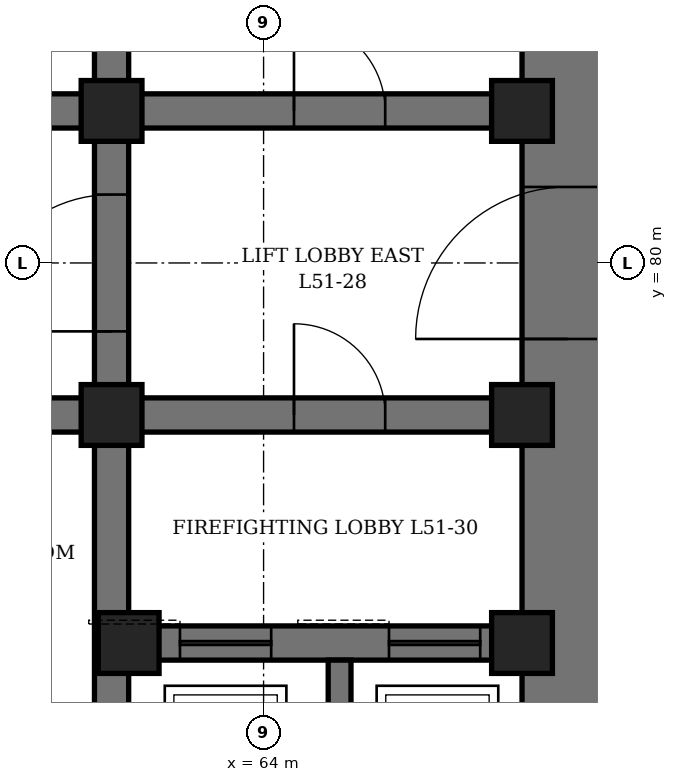
"""IFC4 building model, lengths in metres.
Left out: names, types, materials, properties, quantities, classifications, styles, units other than length and angle.
Written with IfcOpenShell. Run it as: python <this file> out.ifc"""

import sys

from ifc_helpers import new_model, si_unit, direction, frame, frame_2d, origin, origin_2d, place, context, subcontext, project, spatial, rectangle, hollow_rectangle, extrude, element, fill, save


model = new_model("IFC4")
c1 = context("Model", 3, precision=1e-05, world=origin(), true_north=direction((0.0, 1.0)))
c2 = subcontext(c1, "Body", "Model", "MODEL_VIEW")
j1 = project(units=[si_unit("LENGTHUNIT", "METRE"), si_unit("PLANEANGLEUNIT", "RADIAN")], contexts=[c1])
p1 = place(None, origin())
s1 = spatial("IfcSite", under=j1, at=p1, CompositionType="ELEMENT")
p2 = place(p1, origin())
s2 = spatial("IfcBuilding", under=s1, at=p2, CompositionType="ELEMENT")
p3 = place(p2, frame((0.0, 0.0, 227.5)))
s3 = spatial("IfcBuildingStorey", under=s2, at=p3, CompositionType="ELEMENT", Elevation=227.5)
p4 = place(p3, frame((68.0, 70.4, 0.0), z_axis=(0.0, 0.0, 1.0), x_axis=(0.0, 1.0, 0.0)))
e1 = element("IfcWall", 1, at=p4, inside=s3, PredefinedType="SHEAR", context=c2, shape_type="SweptSolid", body=[
    extrude(rectangle(XDim=19.2, YDim=1.2, at=frame_2d((9.6, 0.0))), origin(), (0.0, 0.0, 1.0), 4.2),
])
p5 = place(p4, frame((8.6, 0.0, 0.0)))
e2 = element("IfcOpeningElement", 2, at=p5, cuts=e1, PredefinedType="OPENING", context=c2, shape_type="SweptSolid", body=[
    extrude(rectangle(XDim=2.0, YDim=2.4, at=frame_2d((1.0, 1.2))), frame((0.0, 0.61, 0.0), z_axis=(0.0, -1.0, 0.0), x_axis=(1.0, 0.0, 0.0)), (0.0, 0.0, 1.0), 1.22),
])
p6 = place(p3, frame((62.0, 71.6, 0.0), z_axis=(0.0, 0.0, 1.0), x_axis=(0.0, 1.0, 0.0)))
e3 = element("IfcWall", 3, at=p6, inside=s3, PredefinedType="SHEAR", context=c2, shape_type="SweptSolid", body=[
    extrude(rectangle(XDim=16.8, YDim=0.45, at=frame_2d((8.4, 0.0))), origin(), (0.0, 0.0, 1.0), 4.2),
])
p7 = place(p6, frame((7.5, 0.0, 0.0)))
e4 = element("IfcOpeningElement", 4, at=p7, cuts=e3, PredefinedType="OPENING", context=c2, shape_type="SweptSolid", body=[
    extrude(rectangle(XDim=1.8, YDim=2.4, at=frame_2d((0.9, 1.2))), frame((0.0, 0.235, 0.0), z_axis=(0.0, -1.0, 0.0), x_axis=(1.0, 0.0, 0.0)), (0.0, 0.0, 1.0), 0.47),
])
p8 = place(p3, frame((62.225, 75.0, 0.0), z_axis=(0.0, 0.0, 1.0), x_axis=(1.0, 0.0, 0.0)))
e5 = element("IfcWall", 5, at=p8, inside=s3, PredefinedType="SHEAR", context=c2, shape_type="SweptSolid", body=[
    extrude(rectangle(XDim=5.175, YDim=0.45, at=frame_2d((2.587, 0.0))), origin(), (0.0, 0.0, 1.0), 4.2),
])
p9 = place(p8, frame((0.675, 0.0, 0.0)))
e6 = element("IfcOpeningElement", 6, at=p9, cuts=e5, PredefinedType="OPENING", context=c2, shape_type="SweptSolid", body=[
    extrude(rectangle(XDim=1.2, YDim=2.2, at=frame_2d((0.6, 1.1))), frame((0.0, 0.235, 0.0), z_axis=(0.0, -1.0, 0.0), x_axis=(1.0, 0.0, 0.0)), (0.0, 0.0, 1.0), 0.47),
])
p10 = place(p8, frame((3.425, 0.0, 0.0)))
e7 = element("IfcOpeningElement", 7, at=p10, cuts=e5, PredefinedType="OPENING", context=c2, shape_type="SweptSolid", body=[
    extrude(rectangle(XDim=1.2, YDim=2.2, at=frame_2d((0.6, 1.1))), frame((0.0, 0.235, 0.0), z_axis=(0.0, -1.0, 0.0), x_axis=(1.0, 0.0, 0.0)), (0.0, 0.0, 1.0), 0.47),
])
p11 = place(p3, frame((62.225, 78.0, 0.0), z_axis=(0.0, 0.0, 1.0), x_axis=(1.0, 0.0, 0.0)))
e8 = element("IfcWall", 8, at=p11, inside=s3, PredefinedType="SHEAR", context=c2, shape_type="SweptSolid", body=[
    extrude(rectangle(XDim=5.175, YDim=0.45, at=frame_2d((2.587, 0.0))), origin(), (0.0, 0.0, 1.0), 4.2),
])
p12 = place(p11, frame((2.175, 0.0, 0.0)))
e9 = element("IfcOpeningElement", 9, at=p12, cuts=e8, PredefinedType="OPENING", context=c2, shape_type="SweptSolid", body=[
    extrude(rectangle(XDim=1.2, YDim=2.1, at=frame_2d((0.6, 1.05))), frame((0.0, 0.235, 0.0), z_axis=(0.0, -1.0, 0.0), x_axis=(1.0, 0.0, 0.0)), (0.0, 0.0, 1.0), 0.47),
])
p13 = place(p3, frame((62.225, 82.0, 0.0), z_axis=(0.0, 0.0, 1.0), x_axis=(1.0, 0.0, 0.0)))
e10 = element("IfcWall", 10, at=p13, inside=s3, PredefinedType="SHEAR", context=c2, shape_type="SweptSolid", body=[
    extrude(rectangle(XDim=5.175, YDim=0.45, at=frame_2d((2.587, 0.0))), origin(), (0.0, 0.0, 1.0), 4.2),
])
p14 = place(p13, frame((2.175, 0.0, 0.0)))
e11 = element("IfcOpeningElement", 11, at=p14, cuts=e10, PredefinedType="OPENING", context=c2, shape_type="SweptSolid", body=[
    extrude(rectangle(XDim=1.2, YDim=2.1, at=frame_2d((0.6, 1.05))), frame((0.0, 0.235, 0.0), z_axis=(0.0, -1.0, 0.0), x_axis=(1.0, 0.0, 0.0)), (0.0, 0.0, 1.0), 0.47),
])
p15 = place(p3, frame((50.225, 78.0, 0.0), z_axis=(0.0, 0.0, 1.0), x_axis=(1.0, 0.0, 0.0)))
e12 = element("IfcWall", 12, at=p15, inside=s3, PredefinedType="SHEAR", context=c2, shape_type="SweptSolid", body=[
    extrude(rectangle(XDim=11.55, YDim=0.45, at=frame_2d((5.775, 0.0))), origin(), (0.0, 0.0, 1.0), 4.2),
])
p16 = place(p15, frame((0.825, 0.0, 0.0)))
e13 = element("IfcOpeningElement", 13, at=p16, cuts=e12, PredefinedType="OPENING", context=c2, shape_type="SweptSolid", body=[
    extrude(rectangle(XDim=0.9, YDim=2.1, at=frame_2d((0.45, 1.05))), frame((0.0, 0.235, 0.0), z_axis=(0.0, -1.0, 0.0), x_axis=(1.0, 0.0, 0.0)), (0.0, 0.0, 1.0), 0.47),
])
p17 = place(p15, frame((3.825, 0.0, 0.0)))
e14 = element("IfcOpeningElement", 14, at=p17, cuts=e12, PredefinedType="OPENING", context=c2, shape_type="SweptSolid", body=[
    extrude(rectangle(XDim=0.9, YDim=2.1, at=frame_2d((0.45, 1.05))), frame((0.0, 0.235, 0.0), z_axis=(0.0, -1.0, 0.0), x_axis=(1.0, 0.0, 0.0)), (0.0, 0.0, 1.0), 0.47),
])
p18 = place(p15, frame((6.825, 0.0, 0.0)))
e15 = element("IfcOpeningElement", 15, at=p18, cuts=e12, PredefinedType="OPENING", context=c2, shape_type="SweptSolid", body=[
    extrude(rectangle(XDim=0.9, YDim=2.1, at=frame_2d((0.45, 1.05))), frame((0.0, 0.235, 0.0), z_axis=(0.0, -1.0, 0.0), x_axis=(1.0, 0.0, 0.0)), (0.0, 0.0, 1.0), 0.47),
])
p19 = place(p15, frame((9.825, 0.0, 0.0)))
e16 = element("IfcOpeningElement", 16, at=p19, cuts=e12, PredefinedType="OPENING", context=c2, shape_type="SweptSolid", body=[
    extrude(rectangle(XDim=0.9, YDim=2.1, at=frame_2d((0.45, 1.05))), frame((0.0, 0.235, 0.0), z_axis=(0.0, -1.0, 0.0), x_axis=(1.0, 0.0, 0.0)), (0.0, 0.0, 1.0), 0.47),
])
p20 = place(p3, frame((50.225, 82.0, 0.0), z_axis=(0.0, 0.0, 1.0), x_axis=(1.0, 0.0, 0.0)))
e17 = element("IfcWall", 17, at=p20, inside=s3, PredefinedType="SHEAR", context=c2, shape_type="SweptSolid", body=[
    extrude(rectangle(XDim=11.55, YDim=0.45, at=frame_2d((5.775, 0.0))), origin(), (0.0, 0.0, 1.0), 4.2),
])
p21 = place(p20, frame((0.825, 0.0, 0.0)))
e18 = element("IfcOpeningElement", 18, at=p21, cuts=e17, PredefinedType="OPENING", context=c2, shape_type="SweptSolid", body=[
    extrude(rectangle(XDim=0.9, YDim=2.1, at=frame_2d((0.45, 1.05))), frame((0.0, 0.235, 0.0), z_axis=(0.0, -1.0, 0.0), x_axis=(1.0, 0.0, 0.0)), (0.0, 0.0, 1.0), 0.47),
])
p22 = place(p20, frame((3.825, 0.0, 0.0)))
e19 = element("IfcOpeningElement", 19, at=p22, cuts=e17, PredefinedType="OPENING", context=c2, shape_type="SweptSolid", body=[
    extrude(rectangle(XDim=0.9, YDim=2.1, at=frame_2d((0.45, 1.05))), frame((0.0, 0.235, 0.0), z_axis=(0.0, -1.0, 0.0), x_axis=(1.0, 0.0, 0.0)), (0.0, 0.0, 1.0), 0.47),
])
p23 = place(p20, frame((6.825, 0.0, 0.0)))
e20 = element("IfcOpeningElement", 20, at=p23, cuts=e17, PredefinedType="OPENING", context=c2, shape_type="SweptSolid", body=[
    extrude(rectangle(XDim=0.9, YDim=2.1, at=frame_2d((0.45, 1.05))), frame((0.0, 0.235, 0.0), z_axis=(0.0, -1.0, 0.0), x_axis=(1.0, 0.0, 0.0)), (0.0, 0.0, 1.0), 0.47),
])
p24 = place(p20, frame((9.825, 0.0, 0.0)))
e21 = element("IfcOpeningElement", 21, at=p24, cuts=e17, PredefinedType="OPENING", context=c2, shape_type="SweptSolid", body=[
    extrude(rectangle(XDim=0.9, YDim=2.1, at=frame_2d((0.45, 1.05))), frame((0.0, 0.235, 0.0), z_axis=(0.0, -1.0, 0.0), x_axis=(1.0, 0.0, 0.0)), (0.0, 0.0, 1.0), 0.47),
])
p25 = place(p3, frame((65.0, 71.6, 0.0), z_axis=(0.0, 0.0, 1.0), x_axis=(0.0, 1.0, 0.0)))
e22 = element("IfcWall", 22, at=p25, inside=s3, PredefinedType="SHEAR", context=c2, shape_type="SweptSolid", body=[
    extrude(rectangle(XDim=3.175, YDim=0.3, at=frame_2d((1.587, 0.0))), origin(), (0.0, 0.0, 1.0), 4.2),
])
for number, where, z_axis, x_axis in (
    (23, (62.0, 78.0, 0.0), (0.0, 0.0, 1.0), (1.0, 0.0, 0.0)),
    (24, (62.0, 82.0, 0.0), (0.0, 0.0, 1.0), (1.0, 0.0, 0.0)),
    (25, (62.225, 75.0, 0.0), (0.0, 0.0, 1.0), (1.0, 0.0, 0.0)),
    (26, (67.4, 75.0, 0.0), (0.0, 0.0, 1.0), (1.0, 0.0, 0.0)),
    (27, (67.4, 78.0, 0.0), (0.0, 0.0, 1.0), (1.0, 0.0, 0.0)),
    (28, (67.4, 82.0, 0.0), (0.0, 0.0, 1.0), (1.0, 0.0, 0.0)),
):
    element("IfcColumn", number, at=place(p3, frame(where, z_axis=z_axis, x_axis=x_axis)), inside=s3, PredefinedType="COLUMN", context=c2, shape_type="SweptSolid", body=[
        extrude(hollow_rectangle(XDim=0.8, YDim=0.8, WallThickness=0.1, at=origin_2d()), origin(), (0.0, 0.0, 1.0), 4.2),
    ])
p26 = place(p14, origin())
e29 = element("IfcDoor", 29, at=p26, inside=s3, OperationType="SINGLE_SWING_LEFT", PredefinedType="DOOR", context=c2, shape_type="SweptSolid", body=[
    extrude(rectangle(XDim=1.2, YDim=2.1, at=frame_2d((0.6, 1.05))), frame((0.0, 0.225, 0.0), z_axis=(0.0, -1.0, 0.0), x_axis=(1.0, 0.0, 0.0)), (0.0, 0.0, 1.0), 0.449),
])
fill(e11, e29)
p27 = place(p5, origin())
e30 = element("IfcDoor", 30, at=p27, inside=s3, OperationType="DOUBLE_DOOR_SINGLE_SWING", PredefinedType="DOOR", context=c2, shape_type="SweptSolid", body=[
    extrude(rectangle(XDim=2.0, YDim=2.4, at=frame_2d((1.0, 1.2))), frame((0.0, 0.35, 0.0), z_axis=(0.0, -1.0, 0.0), x_axis=(1.0, 0.0, 0.0)), (0.0, 0.0, 1.0), 0.7),
])
fill(e2, e30)
p28 = place(p7, origin())
e31 = element("IfcDoor", 31, at=p28, inside=s3, OperationType="DOUBLE_DOOR_SINGLE_SWING", PredefinedType="DOOR", context=c2, shape_type="SweptSolid", body=[
    extrude(rectangle(XDim=1.8, YDim=2.4, at=frame_2d((0.9, 1.2))), frame((0.0, 0.225, 0.0), z_axis=(0.0, -1.0, 0.0), x_axis=(1.0, 0.0, 0.0)), (0.0, 0.0, 1.0), 0.449),
])
fill(e4, e31)
p29 = place(p12, origin())
e32 = element("IfcDoor", 32, at=p29, inside=s3, OperationType="SINGLE_SWING_RIGHT", PredefinedType="DOOR", context=c2, shape_type="SweptSolid", body=[
    extrude(rectangle(XDim=1.2, YDim=2.1, at=frame_2d((0.6, 1.05))), frame((0.0, 0.225, 0.0), z_axis=(0.0, -1.0, 0.0), x_axis=(1.0, 0.0, 0.0)), (0.0, 0.0, 1.0), 0.449),
])
fill(e9, e32)
p30 = place(p9, origin())
e33 = element("IfcDoor", 33, at=p30, inside=s3, OperationType="SLIDING_TO_LEFT", PredefinedType="DOOR", context=c2, shape_type="SweptSolid", body=[
    extrude(rectangle(XDim=1.2, YDim=2.2, at=frame_2d((0.6, 1.1))), frame((0.0, 0.225, 0.0), z_axis=(0.0, -1.0, 0.0), x_axis=(1.0, 0.0, 0.0)), (0.0, 0.0, 1.0), 0.449),
])
fill(e6, e33)
p31 = place(p10, origin())
e34 = element("IfcDoor", 34, at=p31, inside=s3, OperationType="SLIDING_TO_LEFT", PredefinedType="DOOR", context=c2, shape_type="SweptSolid", body=[
    extrude(rectangle(XDim=1.2, YDim=2.2, at=frame_2d((0.6, 1.1))), frame((0.0, 0.225, 0.0), z_axis=(0.0, -1.0, 0.0), x_axis=(1.0, 0.0, 0.0)), (0.0, 0.0, 1.0), 0.449),
])
fill(e7, e34)
save(model, sys.argv[1])
